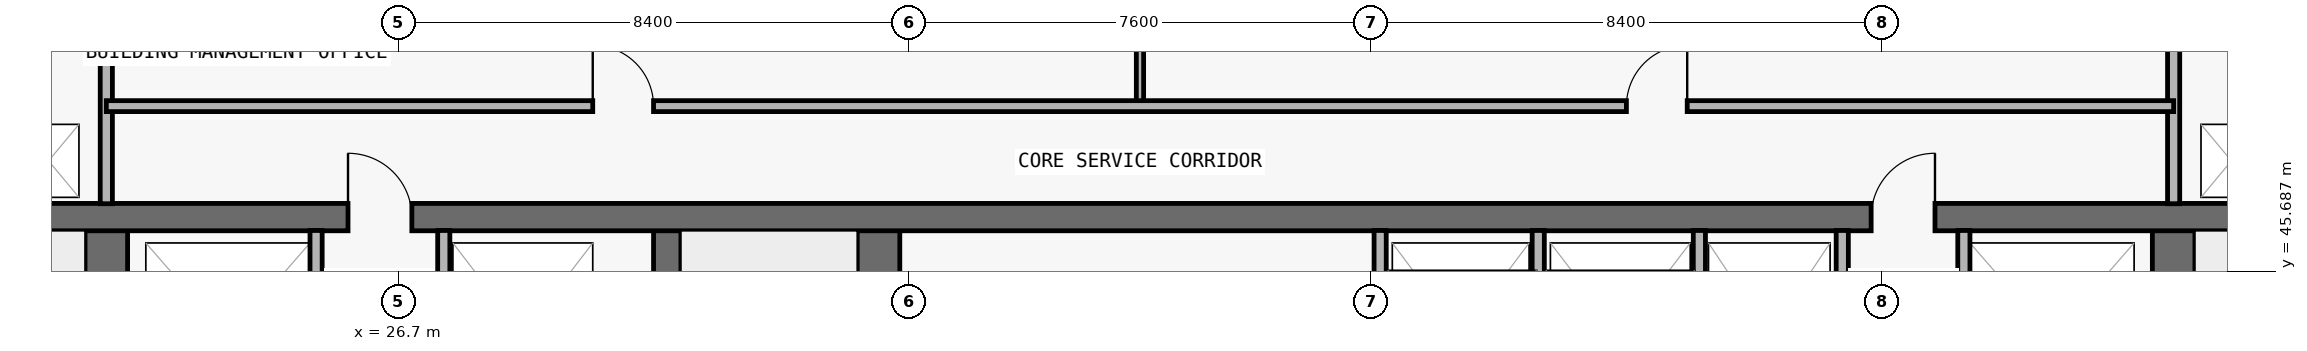
"""IFC4 building model, lengths in metres.
Left out: names, types, materials, properties, quantities, classifications, styles, units other than length and angle.
Written with IfcOpenShell. Run it as: python <this file> out.ifc"""

import sys

from ifc_helpers import new_model, si_unit, direction, frame, frame_2d, origin, place, context, subcontext, project, spatial, rectangle, extrude, element, fill, save


model = new_model("IFC4")
c1 = context("Model", 3, precision=1e-05, world=origin(), true_north=direction((0.0, 1.0)))
c2 = subcontext(c1, "Body", "Model", "MODEL_VIEW")
j1 = project(units=[si_unit("LENGTHUNIT", "METRE"), si_unit("PLANEANGLEUNIT", "RADIAN")], contexts=[c1])
p1 = place(None, origin())
s1 = spatial("IfcSite", under=j1, at=p1, CompositionType="ELEMENT")
p2 = place(p1, origin())
s2 = spatial("IfcBuilding", under=s1, at=p2, CompositionType="ELEMENT")
p3 = place(p2, frame((0.0, 0.0, 152.1)))
s3 = spatial("IfcBuildingStorey", under=s2, at=p3, CompositionType="ELEMENT", Elevation=152.1)
p4 = place(p3, frame((21.9, 36.95, 0.0), z_axis=(0.0, 0.0, 1.0), x_axis=(0.0, 1.0, 0.0)))
e1 = element("IfcWall", 1, at=p4, inside=s3, PredefinedType="SHEAR", context=c2, shape_type="SweptSolid", body=[
    extrude(rectangle(XDim=9.625, YDim=0.7, at=frame_2d((4.812, 0.0))), origin(), (0.0, 0.0, 1.0), 4.85),
])
p5 = place(p4, frame((0.6, 0.0, 0.0)))
e2 = element("IfcOpeningElement", 2, at=p5, cuts=e1, PredefinedType="OPENING", context=c2, shape_type="SweptSolid", body=[
    extrude(rectangle(XDim=1.1, YDim=2.15, at=frame_2d((0.55, 1.075))), frame((0.0, 0.36, 0.0), z_axis=(0.0, -1.0, 0.0), x_axis=(1.0, 0.0, 0.0)), (0.0, 0.0, 1.0), 0.72),
])
p6 = place(p3, frame((55.9, 36.95, 0.0), z_axis=(0.0, 0.0, 1.0), x_axis=(0.0, 1.0, 0.0)))
e3 = element("IfcWall", 3, at=p6, inside=s3, PredefinedType="SHEAR", context=c2, shape_type="SweptSolid", body=[
    extrude(rectangle(XDim=9.625, YDim=0.7, at=frame_2d((4.812, 0.0))), origin(), (0.0, 0.0, 1.0), 4.85),
])
p7 = place(p6, frame((0.6, 0.0, 0.0)))
e4 = element("IfcOpeningElement", 4, at=p7, cuts=e3, PredefinedType="OPENING", context=c2, shape_type="SweptSolid", body=[
    extrude(rectangle(XDim=1.1, YDim=2.15, at=frame_2d((0.55, 1.075))), frame((0.0, 0.36, 0.0), z_axis=(0.0, -1.0, 0.0), x_axis=(1.0, 0.0, 0.0)), (0.0, 0.0, 1.0), 0.72),
])
p8 = place(p3, frame((31.125, 36.95, 0.0), z_axis=(0.0, 0.0, 1.0), x_axis=(0.0, 1.0, 0.0)))
e5 = element("IfcWall", 5, at=p8, inside=s3, PredefinedType="SHEAR", context=c2, shape_type="SweptSolid", body=[
    extrude(rectangle(XDim=9.625, YDim=0.45, at=frame_2d((4.812, 0.0))), origin(), (0.0, 0.0, 1.0), 4.85),
])
p9 = place(p3, frame((34.6, 36.95, 0.0), z_axis=(0.0, 0.0, 1.0), x_axis=(0.0, 1.0, 0.0)))
e6 = element("IfcWall", 6, at=p9, inside=s3, PredefinedType="SHEAR", context=c2, shape_type="SweptSolid", body=[
    extrude(rectangle(XDim=9.625, YDim=0.7, at=frame_2d((4.812, 0.0))), origin(), (0.0, 0.0, 1.0), 4.85),
])
p10 = place(p3, frame((18.25, 46.575, 0.0), z_axis=(0.0, 0.0, 1.0), x_axis=(1.0, 0.0, 0.0)))
e7 = element("IfcWall", 7, at=p10, inside=s3, PredefinedType="SHEAR", context=c2, shape_type="SweptSolid", body=[
    extrude(rectangle(XDim=41.3, YDim=0.45, at=frame_2d((20.65, 0.0))), origin(), (0.0, 0.0, 1.0), 4.85),
])
p11 = place(p10, frame((7.625, 0.0, 0.0)))
e8 = element("IfcOpeningElement", 8, at=p11, cuts=e7, PredefinedType="OPENING", context=c2, shape_type="SweptSolid", body=[
    extrude(rectangle(XDim=1.05, YDim=2.15, at=frame_2d((0.525, 1.075))), frame((0.0, 0.235, 0.0), z_axis=(0.0, -1.0, 0.0), x_axis=(1.0, 0.0, 0.0)), (0.0, 0.0, 1.0), 0.47),
])
p12 = place(p10, frame((32.675, 0.0, 0.0)))
e9 = element("IfcOpeningElement", 9, at=p12, cuts=e7, PredefinedType="OPENING", context=c2, shape_type="SweptSolid", body=[
    extrude(rectangle(XDim=1.05, YDim=2.15, at=frame_2d((0.525, 1.075))), frame((0.0, 0.235, 0.0), z_axis=(0.0, -1.0, 0.0), x_axis=(1.0, 0.0, 0.0)), (0.0, 0.0, 1.0), 0.47),
])
p13 = place(p3, frame((21.9, 46.795, 0.0), z_axis=(0.0, 0.0, 1.0), x_axis=(0.0, 1.0, 0.0)))
e10 = element("IfcWall", 10, at=p13, inside=s3, PredefinedType="PARTITIONING", context=c2, shape_type="SweptSolid", body=[
    extrude(rectangle(XDim=3.16, YDim=0.2, at=frame_2d((1.58, 0.0))), origin(), (0.0, 0.0, 1.0), 4.85),
])
for number, where, z_axis, x_axis in (
    (11, (25.35, 43.17, 0.0), (0.0, 0.0, 1.0), (0.0, 1.0, 0.0)),
    (12, (27.45, 43.17, 0.0), (0.0, 0.0, 1.0), (0.0, 1.0, 0.0)),
):
    element("IfcWall", number, at=place(p3, frame(where, z_axis=z_axis, x_axis=x_axis)), inside=s3, PredefinedType="PARTITIONING", context=c2, shape_type="SweptSolid", body=[
        extrude(rectangle(XDim=3.185, YDim=0.2, at=frame_2d((1.593, 0.0))), origin(), (0.0, 0.0, 1.0), 4.85),
    ])
p14 = place(p3, frame((38.9, 48.4, 0.0), z_axis=(0.0, 0.0, 1.0), x_axis=(0.0, 1.0, 0.0)))
e13 = element("IfcWall", 13, at=p14, inside=s3, PredefinedType="PARTITIONING", context=c2, shape_type="SweptSolid", body=[
    extrude(rectangle(XDim=1.555, YDim=0.12, at=frame_2d((0.778, 0.0))), origin(), (0.0, 0.0, 1.0), 4.85),
])
for number, where, z_axis, x_axis in (
    (14, (42.85, 43.17, 0.0), (0.0, 0.0, 1.0), (0.0, 1.0, 0.0)),
    (15, (45.45, 43.17, 0.0), (0.0, 0.0, 1.0), (0.0, 1.0, 0.0)),
    (16, (48.1, 43.17, 0.0), (0.0, 0.0, 1.0), (0.0, 1.0, 0.0)),
    (17, (50.45, 43.17, 0.0), (0.0, 0.0, 1.0), (0.0, 1.0, 0.0)),
    (18, (52.45, 43.17, 0.0), (0.0, 0.0, 1.0), (0.0, 1.0, 0.0)),
):
    element("IfcWall", number, at=place(p3, frame(where, z_axis=z_axis, x_axis=x_axis)), inside=s3, PredefinedType="PARTITIONING", context=c2, shape_type="SweptSolid", body=[
        extrude(rectangle(XDim=3.185, YDim=0.2, at=frame_2d((1.593, 0.0))), origin(), (0.0, 0.0, 1.0), 4.85),
    ])
p15 = place(p3, frame((55.9, 46.795, 0.0), z_axis=(0.0, 0.0, 1.0), x_axis=(0.0, 1.0, 0.0)))
e19 = element("IfcWall", 19, at=p15, inside=s3, PredefinedType="PARTITIONING", context=c2, shape_type="SweptSolid", body=[
    extrude(rectangle(XDim=3.16, YDim=0.2, at=frame_2d((1.58, 0.0))), origin(), (0.0, 0.0, 1.0), 4.85),
])
p16 = place(p3, frame((21.9, 48.4, 0.0), z_axis=(0.0, 0.0, 1.0), x_axis=(1.0, 0.0, 0.0)))
e20 = element("IfcWall", 20, at=p16, inside=s3, PredefinedType="PARTITIONING", context=c2, shape_type="SweptSolid", body=[
    extrude(rectangle(XDim=34.0, YDim=0.18, at=frame_2d((17.0, 0.0))), origin(), (0.0, 0.0, 1.0), 4.85),
])
p17 = place(p16, frame((8.0, 0.0, 0.0)))
e21 = element("IfcOpeningElement", 21, at=p17, cuts=e20, PredefinedType="OPENING", context=c2, shape_type="SweptSolid", body=[
    extrude(rectangle(XDim=1.0, YDim=2.2, at=frame_2d((0.5, 1.1))), frame((0.0, 0.1, 0.0), z_axis=(0.0, -1.0, 0.0), x_axis=(1.0, 0.0, 0.0)), (0.0, 0.0, 1.0), 0.2),
])
p18 = place(p16, frame((25.0, 0.0, 0.0)))
e22 = element("IfcOpeningElement", 22, at=p18, cuts=e20, PredefinedType="OPENING", context=c2, shape_type="SweptSolid", body=[
    extrude(rectangle(XDim=1.0, YDim=2.2, at=frame_2d((0.5, 1.1))), frame((0.0, 0.1, 0.0), z_axis=(0.0, -1.0, 0.0), x_axis=(1.0, 0.0, 0.0)), (0.0, 0.0, 1.0), 0.2),
])
p19 = place(p11, origin())
e23 = element("IfcDoor", 23, at=p19, inside=s3, OperationType="SINGLE_SWING_LEFT", PredefinedType="DOOR", context=c2, shape_type="SweptSolid", body=[
    extrude(rectangle(XDim=1.05, YDim=2.15, at=frame_2d((0.525, 1.075))), frame((0.0, 0.025, 0.0), z_axis=(0.0, -1.0, 0.0), x_axis=(1.0, 0.0, 0.0)), (0.0, 0.0, 1.0), 0.05),
])
fill(e8, e23)
p20 = place(p12, origin())
e24 = element("IfcDoor", 24, at=p20, inside=s3, OperationType="SINGLE_SWING_RIGHT", PredefinedType="DOOR", context=c2, shape_type="SweptSolid", body=[
    extrude(rectangle(XDim=1.05, YDim=2.15, at=frame_2d((0.525, 1.075))), frame((0.0, 0.025, 0.0), z_axis=(0.0, -1.0, 0.0), x_axis=(1.0, 0.0, 0.0)), (0.0, 0.0, 1.0), 0.05),
])
fill(e9, e24)
p21 = place(p17, origin())
e25 = element("IfcDoor", 25, at=p21, inside=s3, OperationType="SINGLE_SWING_LEFT", PredefinedType="DOOR", context=c2, shape_type="SweptSolid", body=[
    extrude(rectangle(XDim=1.0, YDim=2.2, at=frame_2d((0.5, 1.1))), frame((0.0, 0.025, 0.0), z_axis=(0.0, -1.0, 0.0), x_axis=(1.0, 0.0, 0.0)), (0.0, 0.0, 1.0), 0.05),
])
fill(e21, e25)
p22 = place(p18, origin())
e26 = element("IfcDoor", 26, at=p22, inside=s3, OperationType="SINGLE_SWING_RIGHT", PredefinedType="DOOR", context=c2, shape_type="SweptSolid", body=[
    extrude(rectangle(XDim=1.0, YDim=2.2, at=frame_2d((0.5, 1.1))), frame((0.0, 0.025, 0.0), z_axis=(0.0, -1.0, 0.0), x_axis=(1.0, 0.0, 0.0)), (0.0, 0.0, 1.0), 0.05),
])
fill(e22, e26)
save(model, sys.argv[1])
